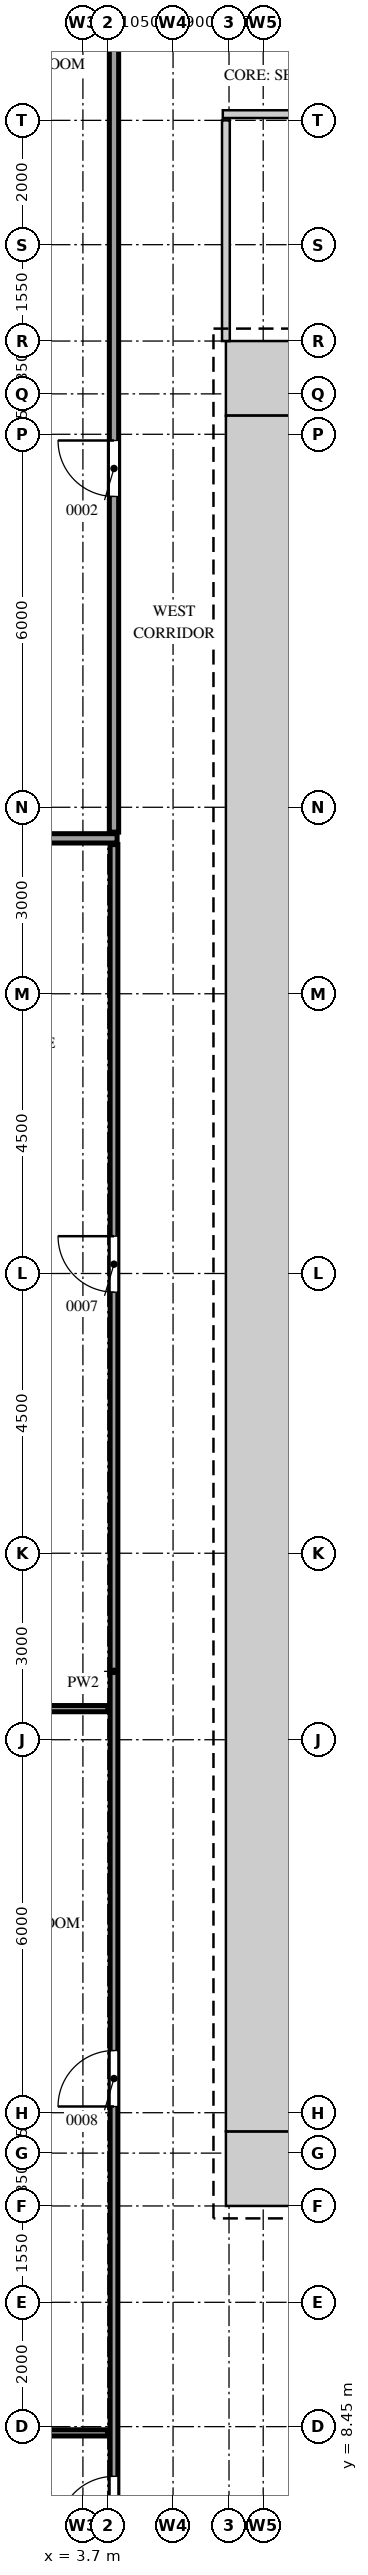
"""IFC4 building model, lengths in metres.
Left out: names, types, materials, properties, quantities, classifications, styles, units other than length and angle.
Written with IfcOpenShell. Run it as: python <this file> out.ifc"""

import sys

from ifc_helpers import new_model, si_unit, direction, frame, frame_2d, origin, place, context, subcontext, project, spatial, rectangle, extrude, source, transform, mapped, element, fill, save


model = new_model("IFC4")
c1 = context("Model", 3, precision=1e-05, world=origin(), true_north=direction((0.0, 1.0)))
c2 = subcontext(c1, "Body", "Model", "MODEL_VIEW")
j1 = project(units=[si_unit("LENGTHUNIT", "METRE"), si_unit("PLANEANGLEUNIT", "RADIAN")], contexts=[c1])
p1 = place(None, origin())
s1 = spatial("IfcSite", under=j1, at=p1, CompositionType="ELEMENT")
p2 = place(p1, origin())
s2 = spatial("IfcBuilding", under=s1, at=p2, CompositionType="ELEMENT")
p3 = place(p2, frame((0.0, 0.0, 33.0)))
s3 = spatial("IfcBuildingStorey", under=s2, at=p3, CompositionType="ELEMENT", Elevation=33.0)
m1 = source(origin(), c2, "Body", "SweptSolid", [
    extrude(rectangle(XDim=1.2, YDim=1.2, at=frame_2d((0.6, 0.0))), origin(), (0.0, 0.0, 1.0), 4.2),
])
for number, where, z_axis, x_axis in (
    (1, (6.0, 41.4, 0.0), (0.0, 0.0, 1.0), (1.0, 0.0, 0.0)),
    (2, (6.0, 12.6, 0.0), (0.0, 0.0, 1.0), (1.0, 0.0, 0.0)),
):
    element("IfcWall", number, at=place(p3, frame(where, z_axis=z_axis, x_axis=x_axis)), inside=s3, PredefinedType="SHEAR", context=c2, shape_type="MappedRepresentation", body=[
        mapped(m1, transform((0.0, 0.0, 0.0))),
    ])
m2 = source(origin(), c2, "Body", "SweptSolid", [
    extrude(rectangle(XDim=27.6, YDim=1.2, at=frame_2d((13.8, 0.0))), origin(), (0.0, 0.0, 1.0), 4.2),
])
p4 = place(p3, frame((6.6, 13.2, 0.0), z_axis=(0.0, 0.0, 1.0), x_axis=(0.0, 1.0, 0.0)))
e3 = element("IfcWall", 3, at=p4, inside=s3, PredefinedType="SHEAR", context=c2, shape_type="MappedRepresentation", body=[
    mapped(m2, transform((0.0, 0.0, 0.0))),
])
m3 = source(origin(), c2, "Body", "SweptSolid", [
    extrude(rectangle(XDim=27.75, YDim=0.125, at=frame_2d((13.875, 0.0))), origin(), (0.0, 0.0, 1.0), 4.3),
])
p5 = place(p3, frame((4.2, 6.15, 0.0), z_axis=(0.0, 0.0, 1.0), x_axis=(0.0, 1.0, 0.0)))
e4 = element("IfcWall", 4, at=p5, inside=s3, PredefinedType="PARTITIONING", context=c2, shape_type="MappedRepresentation", body=[
    mapped(m3, transform((0.0, 0.0, 0.0))),
])
m4 = source(origin(), c2, "Body", "SweptSolid", [
    extrude(rectangle(XDim=0.9, YDim=2.1, at=frame_2d((0.45, 1.05))), frame((0.0, 0.073, 0.0), z_axis=(0.0, -1.0, 0.0), x_axis=(1.0, 0.0, 0.0)), (0.0, 0.0, 1.0), 0.145),
])
p6 = place(p5, frame((0.6, 0.0, 0.0)))
e5 = element("IfcOpeningElement", 5, at=p6, cuts=e4, PredefinedType="OPENING", context=c2, shape_type="MappedRepresentation", body=[
    mapped(m4, transform((0.0, 0.0, 0.0))),
])
p7 = place(p5, frame((7.45, 0.0, 0.0)))
e6 = element("IfcOpeningElement", 6, at=p7, cuts=e4, PredefinedType="OPENING", context=c2, shape_type="MappedRepresentation", body=[
    mapped(m4, transform((0.0, 0.0, 0.0))),
])
p8 = place(p5, frame((20.55, 0.0, 0.0)))
e7 = element("IfcOpeningElement", 7, at=p8, cuts=e4, PredefinedType="OPENING", context=c2, shape_type="MappedRepresentation", body=[
    mapped(m4, transform((0.0, 0.0, 0.0))),
])
m5 = source(origin(), c2, "Body", "SweptSolid", [
    extrude(rectangle(XDim=3.95, YDim=0.1, at=frame_2d((1.975, 0.0))), origin(), (0.0, 0.0, 1.0), 4.3),
])
for number, where, z_axis, x_axis in (
    (8, (0.15, 8.35, 0.0), (0.0, 0.0, 1.0), (1.0, 0.0, 0.0)),
    (9, (0.15, 20.0, 0.0), (0.0, 0.0, 1.0), (1.0, 0.0, 0.0)),
):
    element("IfcWall", number, at=place(p3, frame(where, z_axis=z_axis, x_axis=x_axis)), inside=s3, PredefinedType="PARTITIONING", context=c2, shape_type="MappedRepresentation", body=[
        mapped(m5, transform((0.0, 0.0, 0.0))),
    ])
m6 = source(origin(), c2, "Body", "SweptSolid", [
    extrude(rectangle(XDim=4.1, YDim=0.15, at=frame_2d((2.05, 0.0))), origin(), (0.0, 0.0, 1.0), 4.3),
])
p9 = place(p3, frame((0.15, 34.0, 0.0), z_axis=(0.0, 0.0, 1.0), x_axis=(1.0, 0.0, 0.0)))
e10 = element("IfcWall", 10, at=p9, inside=s3, PredefinedType="PARTITIONING", context=c2, shape_type="MappedRepresentation", body=[
    mapped(m6, transform((0.0, 0.0, 0.0))),
])
m7 = source(origin(), c2, "Body", "SweptSolid", [
    extrude(rectangle(XDim=19.75, YDim=0.15, at=frame_2d((9.875, 0.0))), origin(), (0.0, 0.0, 1.0), 3.6),
])
p10 = place(p3, frame((4.2, 34.1, 0.0), z_axis=(0.0, 0.0, 1.0), x_axis=(0.0, 1.0, 0.0)))
e11 = element("IfcWall", 11, at=p10, inside=s3, PredefinedType="PARTITIONING", context=c2, shape_type="MappedRepresentation", body=[
    mapped(m7, transform((0.0, 0.0, 0.0))),
])
m8 = source(origin(), c2, "Body", "SweptSolid", [
    extrude(rectangle(XDim=0.9, YDim=2.1, at=frame_2d((0.45, 1.05))), frame((0.0, 0.085, 0.0), z_axis=(0.0, -1.0, 0.0), x_axis=(1.0, 0.0, 0.0)), (0.0, 0.0, 1.0), 0.17),
])
p11 = place(p10, frame((5.4, 0.0, 0.0)))
e12 = element("IfcOpeningElement", 12, at=p11, cuts=e11, PredefinedType="OPENING", context=c2, shape_type="MappedRepresentation", body=[
    mapped(m8, transform((0.0, 0.0, 0.0))),
])
m9 = source(origin(), c2, "Body", "SweptSolid", [
    extrude(rectangle(XDim=3.55, YDim=0.125, at=frame_2d((1.775, 0.0))), origin(), (0.0, 0.0, 1.0), 4.3),
])
p12 = place(p3, frame((6.0, 42.0, 0.0), z_axis=(0.0, 0.0, 1.0), x_axis=(0.0, 1.0, 0.0)))
e13 = element("IfcWall", 13, at=p12, inside=s3, PredefinedType="PARTITIONING", context=c2, shape_type="MappedRepresentation", body=[
    mapped(m9, transform((0.0, 0.0, 0.0))),
])
m10 = source(origin(), c2, "Body", "SweptSolid", [
    extrude(rectangle(XDim=7.95, YDim=0.125, at=frame_2d((3.975, 0.0))), origin(), (0.0, 0.0, 1.0), 4.3),
])
p13 = place(p3, frame((5.95, 45.65, 0.0), z_axis=(0.0, 0.0, 1.0), x_axis=(1.0, 0.0, 0.0)))
e14 = element("IfcWall", 14, at=p13, inside=s3, PredefinedType="PARTITIONING", context=c2, shape_type="MappedRepresentation", body=[
    mapped(m10, transform((0.0, 0.0, 0.0))),
])
p14 = place(p13, frame((3.55, 0.0, 0.0)))
e15 = element("IfcOpeningElement", 15, at=p14, cuts=e14, PredefinedType="OPENING", context=c2, shape_type="MappedRepresentation", body=[
    mapped(m4, transform((0.0, 0.0, 0.0))),
])
m11 = source(origin(), c2, "Body", "SweptSolid", [
    extrude(rectangle(XDim=0.9, YDim=2.1, at=frame_2d((0.45, 1.05))), frame((0.0, 0.025, 0.0), z_axis=(0.0, -1.0, 0.0), x_axis=(1.0, 0.0, 0.0)), (0.0, 0.0, 1.0), 0.05),
])
p15 = place(p6, origin())
e16 = element("IfcDoor", 16, at=p15, inside=s3, OperationType="SINGLE_SWING_RIGHT", PredefinedType="DOOR", context=c2, shape_type="MappedRepresentation", body=[
    mapped(m11, transform((0.0, 0.0, 0.0))),
])
fill(e5, e16)
p16 = place(p7, origin())
e17 = element("IfcDoor", 17, at=p16, inside=s3, OperationType="SINGLE_SWING_RIGHT", PredefinedType="DOOR", context=c2, shape_type="MappedRepresentation", body=[
    mapped(m11, transform((0.0, 0.0, 0.0))),
])
fill(e6, e17)
p17 = place(p8, origin())
e18 = element("IfcDoor", 18, at=p17, inside=s3, OperationType="SINGLE_SWING_LEFT", PredefinedType="DOOR", context=c2, shape_type="MappedRepresentation", body=[
    mapped(m11, transform((0.0, 0.0, 0.0))),
])
fill(e7, e18)
p18 = place(p11, origin())
e19 = element("IfcDoor", 19, at=p18, inside=s3, OperationType="SINGLE_SWING_LEFT", PredefinedType="DOOR", context=c2, shape_type="MappedRepresentation", body=[
    mapped(m11, transform((0.0, 0.0, 0.0))),
])
fill(e12, e19)
save(model, sys.argv[1])
